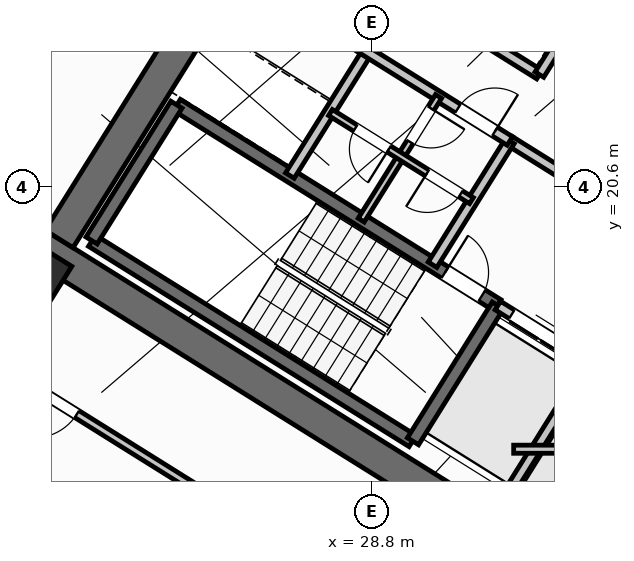
"""IFC4 building model, lengths in metres.
Left out: names, types, materials, properties, quantities, classifications, styles, units other than length and angle.
Written with IfcOpenShell. Run it as: python <this file> out.ifc"""

import sys

from ifc_helpers import new_model, si_unit, direction, frame, frame_2d, origin, origin_2d, place, context, subcontext, project, spatial, rectangle, hollow_rectangle, extrude, source, transform, mapped, element, fill, save


model = new_model("IFC4")
c1 = context("Model", 3, precision=1e-05, world=origin(), true_north=direction((0.0, 1.0)))
c2 = subcontext(c1, "Body", "Model", "MODEL_VIEW")
j1 = project(units=[si_unit("LENGTHUNIT", "METRE"), si_unit("PLANEANGLEUNIT", "RADIAN")], contexts=[c1])
p1 = place(None, origin())
s1 = spatial("IfcSite", under=j1, at=p1, CompositionType="ELEMENT")
p2 = place(p1, origin())
s2 = spatial("IfcBuilding", under=s1, at=p2, CompositionType="ELEMENT")
p3 = place(p2, frame((0.0, 0.0, 49.2)))
s3 = spatial("IfcBuildingStorey", under=s2, at=p3, CompositionType="ELEMENT", Elevation=49.2)
p4 = place(p3, frame((33.409, 12.45, 0.0), z_axis=(0.0, 0.0, 1.0), x_axis=(-0.848051132073, 0.529914405721, 0.0)))
e1 = element("IfcWall", 1, at=p4, inside=s3, PredefinedType="SHEAR", context=c2, shape_type="SweptSolid", body=[
    extrude(rectangle(XDim=13.24, YDim=0.65, at=frame_2d((6.62, 0.0))), origin(), (0.0, 0.0, 1.0), 3.35),
])
p5 = place(p3, frame((26.007, 24.976, 0.0), z_axis=(0.0, 0.0, 1.0), x_axis=(-0.529916319127, -0.848049936456, 0.0)))
e2 = element("IfcWall", 2, at=p5, inside=s3, PredefinedType="SHEAR", context=c2, shape_type="SweptSolid", body=[
    extrude(rectangle(XDim=6.375, YDim=0.65, at=frame_2d((3.188, 0.0))), origin(), (0.0, 0.0, 1.0), 3.35),
])
m1 = source(origin(), c2, "Body", "SweptSolid", [
    extrude(hollow_rectangle(XDim=1.0, YDim=1.0, WallThickness=0.04, at=origin_2d()), origin(), (0.0, 0.0, 1.0), 3.6),
])
p6 = place(p3, frame((22.191, 18.87, 0.0), z_axis=(0.0, 0.0, 1.0), x_axis=(-0.848048096156, 0.529919264233, 0.0)))
e3 = element("IfcColumn", 3, at=p6, inside=s3, PredefinedType="COLUMN", context=c2, shape_type="MappedRepresentation", body=[
    mapped(m1, transform((0.0, 0.0, 0.0), scale=1.0)),
])
p7 = place(p3, frame((29.268, 6.429, 0.0), z_axis=(0.0, 0.0, 1.0), x_axis=(-0.848049971435, 0.529916263149, 0.0)))
e4 = element("IfcWall", 4, at=p7, inside=s3, PredefinedType="STANDARD", context=c2, shape_type="SweptSolid", body=[
    extrude(rectangle(XDim=31.588, YDim=0.32, at=frame_2d((15.794, 0.0))), origin(), (0.0, 0.0, 1.0), 3.35),
])
p8 = place(p7, frame((16.362, 0.0, 0.0)))
e5 = element("IfcOpeningElement", 5, at=p8, cuts=e4, PredefinedType="OPENING", context=c2, shape_type="SweptSolid", body=[
    extrude(rectangle(XDim=1.2, YDim=2.15, at=frame_2d((0.6, 1.075))), frame((0.0, 0.17, 0.0), z_axis=(0.0, -1.0, 0.0), x_axis=(1.0, 0.0, 0.0)), (0.0, 0.0, 1.0), 0.34),
])
p9 = place(p7, frame((2.989, 0.0, 0.8)))
e6 = element("IfcOpeningElement", 6, at=p9, cuts=e4, PredefinedType="OPENING", context=c2, shape_type="SweptSolid", body=[
    extrude(rectangle(XDim=2.1, YDim=1.55, at=frame_2d((1.05, 0.775))), frame((0.0, 0.17, 0.0), z_axis=(0.0, -1.0, 0.0), x_axis=(1.0, 0.0, 0.0)), (0.0, 0.0, 1.0), 0.34),
])
p10 = place(p7, frame((8.359, 0.0, 0.8)))
e7 = element("IfcOpeningElement", 7, at=p10, cuts=e4, PredefinedType="OPENING", context=c2, shape_type="SweptSolid", body=[
    extrude(rectangle(XDim=2.1, YDim=1.55, at=frame_2d((1.05, 0.775))), frame((0.0, 0.17, 0.0), z_axis=(0.0, -1.0, 0.0), x_axis=(1.0, 0.0, 0.0)), (0.0, 0.0, 1.0), 0.34),
])
p11 = place(p7, frame((13.284, 0.0, 0.95)))
e8 = element("IfcOpeningElement", 8, at=p11, cuts=e4, PredefinedType="OPENING", context=c2, shape_type="SweptSolid", body=[
    extrude(rectangle(XDim=1.2, YDim=1.4, at=frame_2d((0.6, 0.7))), frame((0.0, 0.17, 0.0), z_axis=(0.0, -1.0, 0.0), x_axis=(1.0, 0.0, 0.0)), (0.0, 0.0, 1.0), 0.34),
])
p12 = place(p7, frame((20.259, 0.0, 0.95)))
e9 = element("IfcOpeningElement", 9, at=p12, cuts=e4, PredefinedType="OPENING", context=c2, shape_type="SweptSolid", body=[
    extrude(rectangle(XDim=1.2, YDim=1.4, at=frame_2d((0.6, 0.7))), frame((0.0, 0.17, 0.0), z_axis=(0.0, -1.0, 0.0), x_axis=(1.0, 0.0, 0.0)), (0.0, 0.0, 1.0), 0.34),
])
p13 = place(p7, frame((22.929, 0.0, 0.95)))
e10 = element("IfcOpeningElement", 10, at=p13, cuts=e4, PredefinedType="OPENING", context=c2, shape_type="SweptSolid", body=[
    extrude(rectangle(XDim=1.2, YDim=1.4, at=frame_2d((0.6, 0.7))), frame((0.0, 0.17, 0.0), z_axis=(0.0, -1.0, 0.0), x_axis=(1.0, 0.0, 0.0)), (0.0, 0.0, 1.0), 0.34),
])
p14 = place(p7, frame((26.106, 0.0, 0.85)))
e11 = element("IfcOpeningElement", 11, at=p14, cuts=e4, PredefinedType="OPENING", context=c2, shape_type="SweptSolid", body=[
    extrude(rectangle(XDim=1.5, YDim=1.5, at=frame_2d((0.75, 0.75))), frame((0.0, 0.17, 0.0), z_axis=(0.0, -1.0, 0.0), x_axis=(1.0, 0.0, 0.0)), (0.0, 0.0, 1.0), 0.34),
])
p15 = place(p7, frame((29.068, 0.0, 0.85)))
e12 = element("IfcOpeningElement", 12, at=p15, cuts=e4, PredefinedType="OPENING", context=c2, shape_type="SweptSolid", body=[
    extrude(rectangle(XDim=1.8, YDim=1.5, at=frame_2d((0.9, 0.75))), frame((0.0, 0.17, 0.0), z_axis=(0.0, -1.0, 0.0), x_axis=(1.0, 0.0, 0.0)), (0.0, 0.0, 1.0), 0.34),
])
p16 = place(p3, frame((29.605, 15.581, 0.0), z_axis=(0.0, 0.0, 1.0), x_axis=(-0.848036911448, 0.529937163087, 0.0)))
e13 = element("IfcWall", 13, at=p16, inside=s3, PredefinedType="SHEAR", context=c2, shape_type="SweptSolid", body=[
    extrude(rectangle(XDim=7.46, YDim=0.26, at=frame_2d((3.73, 0.0))), origin(), (0.0, 0.0, 1.0), 3.35),
])
p17 = place(p3, frame((31.28, 18.261, 0.0), z_axis=(0.0, 0.0, 1.0), x_axis=(-0.848051618787, 0.529913626805, 0.0)))
e14 = element("IfcWall", 14, at=p17, inside=s3, PredefinedType="SHEAR", context=c2, shape_type="SweptSolid", body=[
    extrude(rectangle(XDim=7.46, YDim=0.26, at=frame_2d((3.73, 0.0))), origin(), (0.0, 0.0, 1.0), 3.35),
])
p18 = place(p17, frame((0.36, 0.0, 0.0)))
e15 = element("IfcOpeningElement", 15, at=p18, cuts=e14, PredefinedType="OPENING", context=c2, shape_type="SweptSolid", body=[
    extrude(rectangle(XDim=0.86, YDim=2.05, at=frame_2d((0.43, 1.025))), frame((0.0, 0.14, 0.0), z_axis=(0.0, -1.0, 0.0), x_axis=(1.0, 0.0, 0.0)), (0.0, 0.0, 1.0), 0.28),
])
p19 = place(p3, frame((31.288, 18.256, 0.0), z_axis=(0.0, 0.0, 1.0), x_axis=(-0.529943379326, -0.848033026897, 0.0)))
e16 = element("IfcWall", 16, at=p19, inside=s3, PredefinedType="SHEAR", context=c2, shape_type="SweptSolid", body=[
    extrude(rectangle(XDim=3.16, YDim=0.26, at=frame_2d((1.58, 0.0))), origin(), (0.0, 0.0, 1.0), 3.35),
])
p20 = place(p3, frame((24.945, 22.22, 0.0), z_axis=(0.0, 0.0, 1.0), x_axis=(-0.529908658664, -0.84805472316, 0.0)))
e17 = element("IfcWall", 17, at=p20, inside=s3, PredefinedType="SHEAR", context=c2, shape_type="SweptSolid", body=[
    extrude(rectangle(XDim=3.16, YDim=0.26, at=frame_2d((1.58, 0.0))), origin(), (0.0, 0.0, 1.0), 3.35),
])
p21 = place(p3, frame((38.046, 21.108, 0.0), z_axis=(0.0, 0.0, 1.0), x_axis=(-0.848054434086, 0.529909121291, 0.0)))
e18 = element("IfcWall", 18, at=p21, inside=s3, PredefinedType="SHEAR", context=c2, shape_type="SweptSolid", body=[
    extrude(rectangle(XDim=7.33, YDim=0.26, at=frame_2d((3.665, 0.0))), origin(), (0.0, 0.0, 1.0), 3.35),
])
p22 = place(p21, frame((0.22, 0.0, 0.0)))
e19 = element("IfcOpeningElement", 19, at=p22, cuts=e18, PredefinedType="OPENING", context=c2, shape_type="SweptSolid", body=[
    extrude(rectangle(XDim=1.1, YDim=2.1, at=frame_2d((0.55, 1.05))), frame((0.0, 0.14, 0.0), z_axis=(0.0, -1.0, 0.0), x_axis=(1.0, 0.0, 0.0)), (0.0, 0.0, 1.0), 0.28),
])
p23 = place(p3, frame((34.848, 16.031, 0.0), z_axis=(0.0, 0.0, 1.0), x_axis=(-0.848044042236, 0.529925751807, 0.0)))
e20 = element("IfcWall", 20, at=p23, inside=s3, PredefinedType="STANDARD", context=c2, shape_type="SweptSolid", body=[
    extrude(rectangle(XDim=4.198, YDim=0.2, at=frame_2d((2.099, 0.0))), origin(), (0.0, 0.0, 1.0), 3.34),
])
p24 = place(p23, frame((0.348, 0.0, 0.0)))
e21 = element("IfcOpeningElement", 21, at=p24, cuts=e20, PredefinedType="OPENING", context=c2, shape_type="SweptSolid", body=[
    extrude(rectangle(XDim=1.3, YDim=2.2, at=frame_2d((0.65, 1.1))), frame((0.0, 0.11, 0.0), z_axis=(0.0, -1.0, 0.0), x_axis=(1.0, 0.0, 0.0)), (0.0, 0.0, 1.0), 0.22),
])
p25 = place(p23, frame((2.423, 0.0, 0.0)))
e22 = element("IfcOpeningElement", 22, at=p25, cuts=e20, PredefinedType="OPENING", context=c2, shape_type="SweptSolid", body=[
    extrude(rectangle(XDim=1.45, YDim=2.25, at=frame_2d((0.725, 1.125))), frame((0.0, 0.11, 0.0), z_axis=(0.0, -1.0, 0.0), x_axis=(1.0, 0.0, 0.0)), (0.0, 0.0, 1.0), 0.22),
])
p26 = place(p3, frame((36.374, 18.474, 0.0), z_axis=(0.0, 0.0, 1.0), x_axis=(-0.848051071577, 0.529914502535, 0.0)))
e23 = element("IfcWall", 23, at=p26, inside=s3, PredefinedType="STANDARD", context=c2, shape_type="SweptSolid", body=[
    extrude(rectangle(XDim=5.718, YDim=0.2, at=frame_2d((2.859, 0.0))), origin(), (0.0, 0.0, 1.0), 3.34),
])
p27 = place(p26, frame((2.498, 0.0, 0.0)))
e24 = element("IfcOpeningElement", 24, at=p27, cuts=e23, PredefinedType="OPENING", context=c2, shape_type="SweptSolid", body=[
    extrude(rectangle(XDim=1.15, YDim=2.1, at=frame_2d((0.575, 1.05))), frame((0.0, 0.11, 0.0), z_axis=(0.0, -1.0, 0.0), x_axis=(1.0, 0.0, 0.0)), (0.0, 0.0, 1.0), 0.22),
])
p28 = place(p3, frame((32.108, 22.814, 0.0), z_axis=(0.0, 0.0, 1.0), x_axis=(-0.848042229521, 0.529928652696, 0.0)))
e25 = element("IfcWall", 25, at=p28, inside=s3, PredefinedType="STANDARD", context=c2, shape_type="SweptSolid", body=[
    extrude(rectangle(XDim=5.62, YDim=0.2, at=frame_2d((2.81, 0.0))), origin(), (0.0, 0.0, 1.0), 3.34),
])
p29 = place(p3, frame((32.982, 24.213, 0.0), z_axis=(0.0, 0.0, 1.0), x_axis=(-0.529839334948, -0.84809803628, 0.0)))
e26 = element("IfcWall", 26, at=p29, inside=s3, PredefinedType="STANDARD", context=c2, shape_type="SweptSolid", body=[
    extrude(rectangle(XDim=1.65, YDim=0.2, at=frame_2d((0.825, 0.0))), origin(), (0.0, 0.0, 1.0), 3.34),
])
p30 = place(p3, frame((33.029, 17.003, 0.0), z_axis=(0.0, 0.0, 1.0), x_axis=(-0.529916267533, -0.848049968695, 0.0)))
e27 = element("IfcWall", 27, at=p30, inside=s3, PredefinedType="STANDARD", context=c2, shape_type="SweptSolid", body=[
    extrude(rectangle(XDim=2.92, YDim=0.2, at=frame_2d((1.46, 0.0))), origin(), (0.0, 0.0, 1.0), 3.34),
])
for number, where, z_axis, x_axis in (
    (28, (31.525, 21.504, 0.0), (0.0, 0.0, 1.0), (-0.53, -0.848, 0.0)),
    (29, (28.71, 23.263, 0.0), (0.0, 0.0, 1.0), (-0.53, -0.848, 0.0)),
):
    element("IfcWall", number, at=place(p3, frame(where, z_axis=z_axis, x_axis=x_axis)), inside=s3, PredefinedType="STANDARD", context=c2, shape_type="SweptSolid", body=[
        extrude(rectangle(XDim=2.88, YDim=0.2, at=frame_2d((1.44, 0.0))), origin(), (0.0, 0.0, 1.0), 3.34),
    ])
p31 = place(p3, frame((31.525, 21.504, 0.0), z_axis=(0.0, 0.0, 1.0), x_axis=(-0.848044998614, 0.529924221305, 0.0)))
e30 = element("IfcWall", 30, at=p31, inside=s3, PredefinedType="STANDARD", context=c2, shape_type="SweptSolid", body=[
    extrude(rectangle(XDim=6.168, YDim=0.2, at=frame_2d((3.084, 0.0))), origin(), (0.0, 0.0, 1.0), 3.34),
])
p32 = place(p31, frame((4.4, 0.0, 0.0)))
e31 = element("IfcOpeningElement", 31, at=p32, cuts=e30, PredefinedType="OPENING", context=c2, shape_type="SweptSolid", body=[
    extrude(rectangle(XDim=0.86, YDim=2.05, at=frame_2d((0.43, 1.025))), frame((0.0, 0.11, 0.0), z_axis=(0.0, -1.0, 0.0), x_axis=(1.0, 0.0, 0.0)), (0.0, 0.0, 1.0), 0.22),
])
p33 = place(p31, frame((0.35, 0.0, 0.0)))
e32 = element("IfcOpeningElement", 32, at=p33, cuts=e30, PredefinedType="OPENING", context=c2, shape_type="SweptSolid", body=[
    extrude(rectangle(XDim=0.86, YDim=2.05, at=frame_2d((0.43, 1.025))), frame((0.0, 0.11, 0.0), z_axis=(0.0, -1.0, 0.0), x_axis=(1.0, 0.0, 0.0)), (0.0, 0.0, 1.0), 0.22),
])
p34 = place(p3, frame((30.117, 22.384, 0.0), z_axis=(0.0, 0.0, 1.0), x_axis=(-0.529951914384, -0.848027693204, 0.0)))
e33 = element("IfcWall", 33, at=p34, inside=s3, PredefinedType="PLUMBINGWALL", context=c2, shape_type="SweptSolid", body=[
    extrude(rectangle(XDim=1.4, YDim=0.14, at=frame_2d((0.7, 0.0))), origin(), (0.0, 0.0, 1.0), 3.34),
])
p35 = place(p34, frame((0.28, 0.0, 0.0)))
e34 = element("IfcOpeningElement", 34, at=p35, cuts=e33, PredefinedType="OPENING", context=c2, shape_type="SweptSolid", body=[
    extrude(rectangle(XDim=0.78, YDim=2.05, at=frame_2d((0.39, 1.025))), frame((0.0, 0.08, 0.0), z_axis=(0.0, -1.0, 0.0), x_axis=(1.0, 0.0, 0.0)), (0.0, 0.0, 1.0), 0.16),
])
p36 = place(p3, frame((29.375, 21.196, 0.0), z_axis=(0.0, 0.0, 1.0), x_axis=(-0.529865479138, -0.848081702443, 0.0)))
e35 = element("IfcWall", 35, at=p36, inside=s3, PredefinedType="PLUMBINGWALL", context=c2, shape_type="SweptSolid", body=[
    extrude(rectangle(XDim=1.48, YDim=0.14, at=frame_2d((0.74, 0.0))), origin(), (0.0, 0.0, 1.0), 3.34),
])
p37 = place(p3, frame((30.766, 20.327, 0.0), z_axis=(0.0, 0.0, 1.0), x_axis=(-0.848052663127, 0.529911955482, 0.0)))
e36 = element("IfcWall", 36, at=p37, inside=s3, PredefinedType="PLUMBINGWALL", context=c2, shape_type="SweptSolid", body=[
    extrude(rectangle(XDim=3.28, YDim=0.14, at=frame_2d((1.64, 0.0))), origin(), (0.0, 0.0, 1.0), 3.34),
])
p38 = place(p37, frame((0.25, 0.0, 0.0)))
e37 = element("IfcOpeningElement", 37, at=p38, cuts=e36, PredefinedType="OPENING", context=c2, shape_type="SweptSolid", body=[
    extrude(rectangle(XDim=0.78, YDim=2.05, at=frame_2d((0.39, 1.025))), frame((0.0, 0.08, 0.0), z_axis=(0.0, -1.0, 0.0), x_axis=(1.0, 0.0, 0.0)), (0.0, 0.0, 1.0), 0.16),
])
p39 = place(p37, frame((1.92, 0.0, 0.0)))
e38 = element("IfcOpeningElement", 38, at=p39, cuts=e36, PredefinedType="OPENING", context=c2, shape_type="SweptSolid", body=[
    extrude(rectangle(XDim=0.78, YDim=2.05, at=frame_2d((0.39, 1.025))), frame((0.0, 0.08, 0.0), z_axis=(0.0, -1.0, 0.0), x_axis=(1.0, 0.0, 0.0)), (0.0, 0.0, 1.0), 0.16),
])
p40 = place(p3, frame((32.164, 10.374, 0.0), z_axis=(0.0, 0.0, 1.0), x_axis=(-0.848044107957, 0.529925646633, 0.0)))
e39 = element("IfcWall", 39, at=p40, inside=s3, PredefinedType="PARTITIONING", context=c2, shape_type="SweptSolid", body=[
    extrude(rectangle(XDim=15.57, YDim=0.16, at=frame_2d((7.785, 0.0))), origin(), (0.0, 0.0, 1.0), 3.34),
])
p41 = place(p40, frame((10.83, 0.0, 0.0)))
e40 = element("IfcOpeningElement", 40, at=p41, cuts=e39, PredefinedType="OPENING", context=c2, shape_type="SweptSolid", body=[
    extrude(rectangle(XDim=1.0, YDim=2.1, at=frame_2d((0.5, 1.05))), frame((0.0, 0.09, 0.0), z_axis=(0.0, -1.0, 0.0), x_axis=(1.0, 0.0, 0.0)), (0.0, 0.0, 1.0), 0.18),
])
p42 = place(p3, frame((29.72, 8.859, 0.0), z_axis=(0.0, 0.0, 1.0), x_axis=(-0.848049134363, 0.529917602752, 0.0)))
e41 = element("IfcWall", 41, at=p42, inside=s3, PredefinedType="PLUMBINGWALL", context=c2, shape_type="SweptSolid", body=[
    extrude(rectangle(XDim=14.3, YDim=0.14, at=frame_2d((7.15, 0.0))), origin(), (0.0, 0.0, 1.0), 3.34),
])
p43 = place(p42, frame((9.57, 0.0, 0.0)))
e42 = element("IfcOpeningElement", 42, at=p43, cuts=e41, PredefinedType="OPENING", context=c2, shape_type="SweptSolid", body=[
    extrude(rectangle(XDim=0.92, YDim=2.08, at=frame_2d((0.46, 1.04))), frame((0.0, 0.08, 0.0), z_axis=(0.0, -1.0, 0.0), x_axis=(1.0, 0.0, 0.0)), (0.0, 0.0, 1.0), 0.16),
])
p44 = place(p3, frame((31.6, 15.42, 0.0), z_axis=(0.0, 0.0, 1.0), x_axis=(1.0, 0.0, 0.0)))
e43 = element("IfcWall", 43, at=p44, inside=s3, PredefinedType="PARTITIONING", context=c2, shape_type="SweptSolid", body=[
    extrude(rectangle(XDim=2.866, YDim=0.16, at=frame_2d((1.433, 0.0))), origin(), (0.0, 0.0, 1.0), 3.34),
])
m2 = source(origin(), c2, "Body", "SweptSolid", [
    extrude(rectangle(XDim=0.86, YDim=2.05, at=frame_2d((0.43, 1.025))), frame((0.0, 0.025, 0.0), z_axis=(0.0, -1.0, 0.0), x_axis=(1.0, 0.0, 0.0)), (0.0, 0.0, 1.0), 0.05),
])
p45 = place(p18, frame((0.86, 0.0, 0.0), z_axis=(0.0, 0.0, 1.0), x_axis=(-1.0, 0.0, 0.0)))
e44 = element("IfcDoor", 44, at=p45, inside=s3, OperationType="SINGLE_SWING_LEFT", PredefinedType="DOOR", context=c2, shape_type="MappedRepresentation", body=[
    mapped(m2, transform((0.0, 0.0, 0.0), scale=1.0)),
])
fill(e15, e44)
m3 = source(origin(), c2, "Body", "SweptSolid", [
    extrude(rectangle(XDim=1.45, YDim=2.25, at=frame_2d((0.725, 1.125))), frame((0.0, 0.025, 0.0), z_axis=(0.0, -1.0, 0.0), x_axis=(1.0, 0.0, 0.0)), (0.0, 0.0, 1.0), 0.05),
])
p46 = place(p25, origin())
e45 = element("IfcDoor", 45, at=p46, inside=s3, OperationType="DOUBLE_DOOR_SLIDING", PredefinedType="DOOR", context=c2, shape_type="MappedRepresentation", body=[
    mapped(m3, transform((0.0, 0.0, 0.0), scale=1.0)),
])
fill(e22, e45)
p47 = place(p33, frame((0.86, 0.0, 0.0), z_axis=(0.0, 0.0, 1.0), x_axis=(-1.0, 0.0, 0.0)))
e46 = element("IfcDoor", 46, at=p47, inside=s3, OperationType="SINGLE_SWING_RIGHT", PredefinedType="DOOR", context=c2, shape_type="MappedRepresentation", body=[
    mapped(m2, transform((0.0, 0.0, 0.0), scale=1.0)),
])
fill(e32, e46)
m4 = source(origin(), c2, "Body", "SweptSolid", [
    extrude(rectangle(XDim=0.78, YDim=2.05, at=frame_2d((0.39, 1.025))), frame((0.0, 0.025, 0.0), z_axis=(0.0, -1.0, 0.0), x_axis=(1.0, 0.0, 0.0)), (0.0, 0.0, 1.0), 0.05),
])
p48 = place(p35, origin())
e47 = element("IfcDoor", 47, at=p48, inside=s3, OperationType="SINGLE_SWING_LEFT", PredefinedType="DOOR", context=c2, shape_type="MappedRepresentation", body=[
    mapped(m4, transform((0.0, 0.0, 0.0), scale=1.0)),
])
fill(e34, e47)
p49 = place(p38, origin())
e48 = element("IfcDoor", 48, at=p49, inside=s3, OperationType="SINGLE_SWING_RIGHT", PredefinedType="DOOR", context=c2, shape_type="MappedRepresentation", body=[
    mapped(m4, transform((0.0, 0.0, 0.0), scale=1.0)),
])
fill(e37, e48)
p50 = place(p39, origin())
e49 = element("IfcDoor", 49, at=p50, inside=s3, OperationType="SINGLE_SWING_LEFT", PredefinedType="DOOR", context=c2, shape_type="MappedRepresentation", body=[
    mapped(m4, transform((0.0, 0.0, 0.0), scale=1.0)),
])
fill(e38, e49)
m5 = source(origin(), c2, "Body", "SweptSolid", [
    extrude(rectangle(XDim=1.0, YDim=2.1, at=frame_2d((0.5, 1.05))), frame((0.0, 0.025, 0.0), z_axis=(0.0, -1.0, 0.0), x_axis=(1.0, 0.0, 0.0)), (0.0, 0.0, 1.0), 0.05),
])
p51 = place(p41, origin())
e50 = element("IfcDoor", 50, at=p51, inside=s3, OperationType="SINGLE_SWING_RIGHT", PredefinedType="DOOR", context=c2, shape_type="MappedRepresentation", body=[
    mapped(m5, transform((0.0, 0.0, 0.0), scale=1.0)),
])
fill(e40, e50)
save(model, sys.argv[1])
